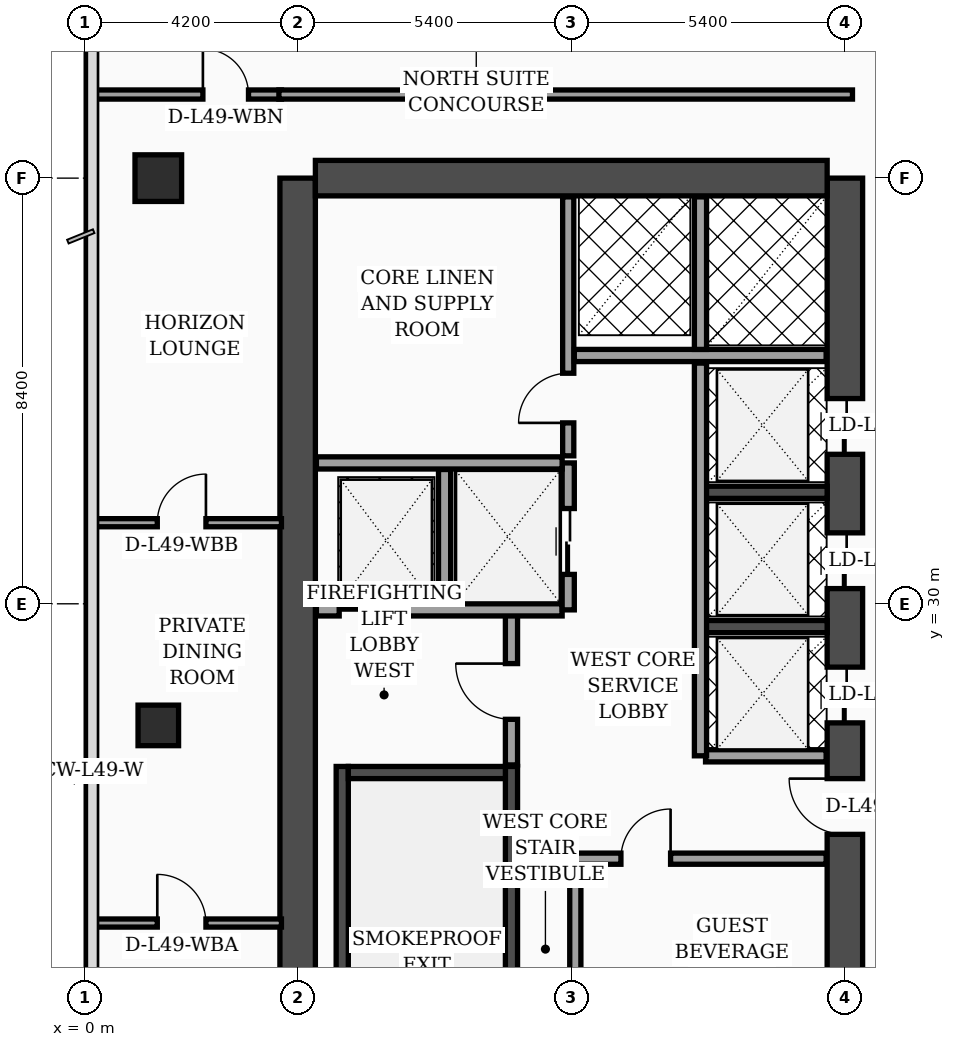
"""IFC4 building model, lengths in metres.
Left out: names, types, materials, properties, quantities, classifications, styles, units other than length and angle.
Written with IfcOpenShell. Run it as: python <this file> out.ifc"""

import sys

from ifc_helpers import new_model, si_unit, direction, frame, frame_2d, origin, origin_2d, place, context, subcontext, project, spatial, rectangle, extrude, element, fill, save


model = new_model("IFC4")
c1 = context("Model", 3, precision=1e-05, world=origin(), true_north=direction((0.0, 1.0)))
c2 = subcontext(c1, "Body", "Model", "MODEL_VIEW")
j1 = project(units=[si_unit("LENGTHUNIT", "METRE"), si_unit("PLANEANGLEUNIT", "RADIAN")], contexts=[c1])
p1 = place(None, origin())
s1 = spatial("IfcSite", under=j1, at=p1, CompositionType="ELEMENT")
p2 = place(p1, origin())
s2 = spatial("IfcBuilding", under=s1, at=p2, CompositionType="ELEMENT")
p3 = place(p2, frame((0.0, 0.0, 199.6)))
s3 = spatial("IfcBuildingStorey", under=s2, at=p3, CompositionType="ELEMENT", Elevation=199.6)
p4 = place(p3, frame((4.2, 16.8, 0.0), z_axis=(0.0, 0.0, 1.0), x_axis=(0.0, 1.0, 0.0)))
e1 = element("IfcWall", 1, at=p4, inside=s3, PredefinedType="SHEAR", context=c2, shape_type="SweptSolid", body=[
    extrude(rectangle(XDim=21.6, YDim=0.7, at=frame_2d((10.8, 0.0))), origin(), (0.0, 0.0, 1.0), 3.56),
])
p5 = place(p3, frame((15.0, 16.8, 0.0), z_axis=(0.0, 0.0, 1.0), x_axis=(0.0, 1.0, 0.0)))
e2 = element("IfcWall", 2, at=p5, inside=s3, PredefinedType="SHEAR", context=c2, shape_type="SweptSolid", body=[
    extrude(rectangle(XDim=21.6, YDim=0.7, at=frame_2d((10.8, 0.0))), origin(), (0.0, 0.0, 1.0), 3.56),
])
p6 = place(p5, frame((8.65, 0.0, 0.0)))
e3 = element("IfcOpeningElement", 3, at=p6, cuts=e2, PredefinedType="OPENING", context=c2, shape_type="SweptSolid", body=[
    extrude(rectangle(XDim=1.1, YDim=2.2, at=frame_2d((0.55, 1.1))), frame((0.0, 0.36, 0.0), z_axis=(0.0, -1.0, 0.0), x_axis=(1.0, 0.0, 0.0)), (0.0, 0.0, 1.0), 0.72),
])
p7 = place(p5, frame((10.85, 0.0, 0.0)))
e4 = element("IfcOpeningElement", 4, at=p7, cuts=e2, PredefinedType="OPENING", context=c2, shape_type="SweptSolid", body=[
    extrude(rectangle(XDim=1.1, YDim=2.2, at=frame_2d((0.55, 1.1))), frame((0.0, 0.36, 0.0), z_axis=(0.0, -1.0, 0.0), x_axis=(1.0, 0.0, 0.0)), (0.0, 0.0, 1.0), 0.72),
])
p8 = place(p5, frame((13.5, 0.0, 0.0)))
e5 = element("IfcOpeningElement", 5, at=p8, cuts=e2, PredefinedType="OPENING", context=c2, shape_type="SweptSolid", body=[
    extrude(rectangle(XDim=1.1, YDim=2.2, at=frame_2d((0.55, 1.1))), frame((0.0, 0.36, 0.0), z_axis=(0.0, -1.0, 0.0), x_axis=(1.0, 0.0, 0.0)), (0.0, 0.0, 1.0), 0.72),
])
p9 = place(p5, frame((16.15, 0.0, 0.0)))
e6 = element("IfcOpeningElement", 6, at=p9, cuts=e2, PredefinedType="OPENING", context=c2, shape_type="SweptSolid", body=[
    extrude(rectangle(XDim=1.1, YDim=2.2, at=frame_2d((0.55, 1.1))), frame((0.0, 0.36, 0.0), z_axis=(0.0, -1.0, 0.0), x_axis=(1.0, 0.0, 0.0)), (0.0, 0.0, 1.0), 0.72),
])
p10 = place(p3, frame((4.55, 38.4, 0.0), z_axis=(0.0, 0.0, 1.0), x_axis=(1.0, 0.0, 0.0)))
e7 = element("IfcWall", 7, at=p10, inside=s3, PredefinedType="SHEAR", context=c2, shape_type="SweptSolid", body=[
    extrude(rectangle(XDim=10.1, YDim=0.7, at=frame_2d((5.05, 0.0))), origin(), (0.0, 0.0, 1.0), 3.56),
])
p11 = place(p3, frame((5.08, 17.15, 0.0), z_axis=(0.0, 0.0, 1.0), x_axis=(0.0, 1.0, 0.0)))
e8 = element("IfcWall", 8, at=p11, inside=s3, PredefinedType="SOLIDWALL", context=c2, shape_type="SweptSolid", body=[
    extrude(rectangle(XDim=9.64, YDim=0.24, at=frame_2d((4.82, 0.0))), origin(), (0.0, 0.0, 1.0), 3.56),
])
p12 = place(p3, frame((8.42, 17.15, 0.0), z_axis=(0.0, 0.0, 1.0), x_axis=(0.0, 1.0, 0.0)))
e9 = element("IfcWall", 9, at=p12, inside=s3, PredefinedType="SOLIDWALL", context=c2, shape_type="SweptSolid", body=[
    extrude(rectangle(XDim=9.64, YDim=0.24, at=frame_2d((4.82, 0.0))), origin(), (0.0, 0.0, 1.0), 3.56),
])
p13 = place(p12, frame((0.35, 0.0, 0.0)))
e10 = element("IfcOpeningElement", 10, at=p13, cuts=e9, PredefinedType="OPENING", context=c2, shape_type="SweptSolid", body=[
    extrude(rectangle(XDim=1.15, YDim=2.2, at=frame_2d((0.575, 1.1))), frame((0.0, 0.13, 0.0), z_axis=(0.0, -1.0, 0.0), x_axis=(1.0, 0.0, 0.0)), (0.0, 0.0, 1.0), 0.26),
])
p14 = place(p3, frame((5.2, 26.67, 0.0), z_axis=(0.0, 0.0, 1.0), x_axis=(1.0, 0.0, 0.0)))
e11 = element("IfcWall", 11, at=p14, inside=s3, PredefinedType="SOLIDWALL", context=c2, shape_type="SweptSolid", body=[
    extrude(rectangle(XDim=3.1, YDim=0.24, at=frame_2d((1.55, 0.0))), origin(), (0.0, 0.0, 1.0), 3.56),
])
for number, where, z_axis, x_axis in (
    (12, (12.18, 29.55, 0.0), (0.0, 0.0, 1.0), (1.0, 0.0, 0.0)),
    (13, (12.18, 32.2, 0.0), (0.0, 0.0, 1.0), (1.0, 0.0, 0.0)),
):
    element("IfcWall", number, at=place(p3, frame(where, z_axis=z_axis, x_axis=x_axis)), inside=s3, PredefinedType="SOLIDWALL", context=c2, shape_type="SweptSolid", body=[
        extrude(rectangle(XDim=2.47, YDim=0.24, at=frame_2d((1.235, 0.0))), origin(), (0.0, 0.0, 1.0), 3.56),
    ])
p15 = place(p3, frame((1.45, 27.6, 0.0), z_axis=(0.0, 0.0, 1.0), x_axis=(1.0, 0.0, 0.0)))
e14 = element("IfcColumn", 14, at=p15, inside=s3, PredefinedType="COLUMN", context=c2, shape_type="SweptSolid", body=[
    extrude(rectangle(XDim=0.8, YDim=0.8, at=origin_2d()), origin(), (0.0, 0.0, 1.0), 3.56),
])
p16 = place(p3, frame((1.45, 38.4, 0.0), z_axis=(0.0, 0.0, 1.0), x_axis=(1.0, 0.0, 0.0)))
e15 = element("IfcColumn", 15, at=p16, inside=s3, PredefinedType="COLUMN", context=c2, shape_type="SweptSolid", body=[
    extrude(rectangle(XDim=0.92, YDim=0.92, at=origin_2d()), origin(), (0.0, 0.0, 1.0), 3.56),
])
p17 = place(p3, frame((8.42, 26.82, 0.0), z_axis=(0.0, 0.0, 1.0), x_axis=(0.0, 1.0, 0.0)))
e16 = element("IfcWall", 16, at=p17, inside=s3, PredefinedType="SOLIDWALL", context=c2, shape_type="SweptSolid", body=[
    extrude(rectangle(XDim=3.0, YDim=0.24, at=frame_2d((1.5, 0.0))), origin(), (0.0, 0.0, 1.0), 3.56),
])
p18 = place(p17, frame((0.9, 0.0, 0.0)))
e17 = element("IfcOpeningElement", 17, at=p18, cuts=e16, PredefinedType="OPENING", context=c2, shape_type="SweptSolid", body=[
    extrude(rectangle(XDim=1.1, YDim=2.2, at=frame_2d((0.55, 1.1))), frame((0.0, 0.13, 0.0), z_axis=(0.0, -1.0, 0.0), x_axis=(1.0, 0.0, 0.0)), (0.0, 0.0, 1.0), 0.26),
])
p19 = place(p3, frame((4.57, 29.88, 0.0), z_axis=(0.0, 0.0, 1.0), x_axis=(1.0, 0.0, 0.0)))
e18 = element("IfcWall", 18, at=p19, inside=s3, PredefinedType="SOLIDWALL", context=c2, shape_type="SweptSolid", body=[
    extrude(rectangle(XDim=4.85, YDim=0.24, at=frame_2d((2.425, 0.0))), origin(), (0.0, 0.0, 1.0), 3.56),
])
p20 = place(p19, frame((0.45, 0.0, 0.0)))
e19 = element("IfcOpeningElement", 19, at=p20, cuts=e18, PredefinedType="OPENING", context=c2, shape_type="SweptSolid", body=[
    extrude(rectangle(XDim=1.3, YDim=2.35, at=frame_2d((0.65, 1.175))), frame((0.0, 0.13, 0.0), z_axis=(0.0, -1.0, 0.0), x_axis=(1.0, 0.0, 0.0)), (0.0, 0.0, 1.0), 0.26),
])
p21 = place(p3, frame((7.1, 30.02, 0.0), z_axis=(0.0, 0.0, 1.0), x_axis=(0.0, 1.0, 0.0)))
e20 = element("IfcWall", 20, at=p21, inside=s3, PredefinedType="SOLIDWALL", context=c2, shape_type="SweptSolid", body=[
    extrude(rectangle(XDim=2.63, YDim=0.24, at=frame_2d((1.315, 0.0))), origin(), (0.0, 0.0, 1.0), 3.56),
])
p22 = place(p3, frame((9.54, 29.88, 0.0), z_axis=(0.0, 0.0, 1.0), x_axis=(0.0, 1.0, 0.0)))
e21 = element("IfcWall", 21, at=p22, inside=s3, PredefinedType="SOLIDWALL", context=c2, shape_type="SweptSolid", body=[
    extrude(rectangle(XDim=2.9, YDim=0.24, at=frame_2d((1.45, 0.0))), origin(), (0.0, 0.0, 1.0), 3.56),
])
p23 = place(p22, frame((0.7, 0.0, 0.0)))
e22 = element("IfcOpeningElement", 22, at=p23, cuts=e21, PredefinedType="OPENING", context=c2, shape_type="SweptSolid", body=[
    extrude(rectangle(XDim=1.3, YDim=2.35, at=frame_2d((0.65, 1.175))), frame((0.0, 0.13, 0.0), z_axis=(0.0, -1.0, 0.0), x_axis=(1.0, 0.0, 0.0)), (0.0, 0.0, 1.0), 0.26),
])
p24 = place(p3, frame((4.57, 32.78, 0.0), z_axis=(0.0, 0.0, 1.0), x_axis=(1.0, 0.0, 0.0)))
e23 = element("IfcWall", 23, at=p24, inside=s3, PredefinedType="SOLIDWALL", context=c2, shape_type="SweptSolid", body=[
    extrude(rectangle(XDim=4.85, YDim=0.24, at=frame_2d((2.425, 0.0))), origin(), (0.0, 0.0, 1.0), 3.19),
])
p25 = place(p3, frame((9.68, 17.17, 0.0), z_axis=(0.0, 0.0, 1.0), x_axis=(0.0, 1.0, 0.0)))
e24 = element("IfcWall", 24, at=p25, inside=s3, PredefinedType="SOLIDWALL", context=c2, shape_type="SweptSolid", body=[
    extrude(rectangle(XDim=7.83, YDim=0.22, at=frame_2d((3.915, 0.0))), origin(), (0.0, 0.0, 1.0), 3.56),
])
p26 = place(p3, frame((9.54, 32.92, 0.0), z_axis=(0.0, 0.0, 1.0), x_axis=(0.0, 1.0, 0.0)))
e25 = element("IfcWall", 25, at=p26, inside=s3, PredefinedType="SOLIDWALL", context=c2, shape_type="SweptSolid", body=[
    extrude(rectangle(XDim=5.11, YDim=0.22, at=frame_2d((2.555, 0.0))), origin(), (0.0, 0.0, 1.0), 3.56),
])
p27 = place(p26, frame((0.65, 0.0, 0.0)))
e26 = element("IfcOpeningElement", 26, at=p27, cuts=e25, PredefinedType="OPENING", context=c2, shape_type="SweptSolid", body=[
    extrude(rectangle(XDim=0.98, YDim=2.15, at=frame_2d((0.49, 1.075))), frame((0.0, 0.12, 0.0), z_axis=(0.0, -1.0, 0.0), x_axis=(1.0, 0.0, 0.0)), (0.0, 0.0, 1.0), 0.24),
])
p28 = place(p3, frame((9.68, 24.97, 0.0), z_axis=(0.0, 0.0, 1.0), x_axis=(1.0, 0.0, 0.0)))
e27 = element("IfcWall", 27, at=p28, inside=s3, PredefinedType="SOLIDWALL", context=c2, shape_type="SweptSolid", body=[
    extrude(rectangle(XDim=4.95, YDim=0.22, at=frame_2d((2.475, 0.0))), origin(), (0.0, 0.0, 1.0), 2.94),
])
p29 = place(p28, frame((0.9, 0.0, 0.0)))
e28 = element("IfcOpeningElement", 28, at=p29, cuts=e27, PredefinedType="OPENING", context=c2, shape_type="SweptSolid", body=[
    extrude(rectangle(XDim=0.98, YDim=2.15, at=frame_2d((0.49, 1.075))), frame((0.0, 0.12, 0.0), z_axis=(0.0, -1.0, 0.0), x_axis=(1.0, 0.0, 0.0)), (0.0, 0.0, 1.0), 0.24),
])
p30 = place(p3, frame((12.25, 27.0, 0.0), z_axis=(0.0, 0.0, 1.0), x_axis=(1.0, 0.0, 0.0)))
e29 = element("IfcWall", 29, at=p30, inside=s3, PredefinedType="SOLIDWALL", context=c2, shape_type="SweptSolid", body=[
    extrude(rectangle(XDim=2.38, YDim=0.24, at=frame_2d((1.19, 0.0))), origin(), (0.0, 0.0, 1.0), 3.56),
])
p31 = place(p3, frame((12.15, 27.0, 0.0), z_axis=(0.0, 0.0, 1.0), x_axis=(0.0, 1.0, 0.0)))
e30 = element("IfcWall", 30, at=p31, inside=s3, PredefinedType="SOLIDWALL", context=c2, shape_type="SweptSolid", body=[
    extrude(rectangle(XDim=7.75, YDim=0.24, at=frame_2d((3.875, 0.0))), origin(), (0.0, 0.0, 1.0), 3.56),
])
p32 = place(p3, frame((9.66, 34.9, 0.0), z_axis=(0.0, 0.0, 1.0), x_axis=(1.0, 0.0, 0.0)))
e31 = element("IfcWall", 31, at=p32, inside=s3, PredefinedType="SOLIDWALL", context=c2, shape_type="SweptSolid", body=[
    extrude(rectangle(XDim=4.97, YDim=0.24, at=frame_2d((2.485, 0.0))), origin(), (0.0, 0.0, 1.0), 3.56),
])
p33 = place(p3, frame((12.15, 35.02, 0.0), z_axis=(0.0, 0.0, 1.0), x_axis=(0.0, 1.0, 0.0)))
e32 = element("IfcWall", 32, at=p33, inside=s3, PredefinedType="SOLIDWALL", context=c2, shape_type="SweptSolid", body=[
    extrude(rectangle(XDim=3.01, YDim=0.24, at=frame_2d((1.505, 0.0))), origin(), (0.0, 0.0, 1.0), 3.56),
])
p34 = place(p3, frame((0.08, 23.7, 0.0), z_axis=(0.0, 0.0, 1.0), x_axis=(1.0, 0.0, 0.0)))
e33 = element("IfcWall", 33, at=p34, inside=s3, PredefinedType="PARTITIONING", context=c2, shape_type="SweptSolid", body=[
    extrude(rectangle(XDim=3.8, YDim=0.16, at=frame_2d((1.9, 0.0))), origin(), (0.0, 0.0, 1.0), 3.09),
])
p35 = place(p34, frame((1.35, 0.0, 0.0)))
e34 = element("IfcOpeningElement", 34, at=p35, cuts=e33, PredefinedType="OPENING", context=c2, shape_type="SweptSolid", body=[
    extrude(rectangle(XDim=0.96, YDim=2.2, at=frame_2d((0.48, 1.1))), frame((0.0, 0.09, 0.0), z_axis=(0.0, -1.0, 0.0), x_axis=(1.0, 0.0, 0.0)), (0.0, 0.0, 1.0), 0.18),
])
p36 = place(p3, frame((0.08, 31.6, 0.0), z_axis=(0.0, 0.0, 1.0), x_axis=(1.0, 0.0, 0.0)))
e35 = element("IfcWall", 35, at=p36, inside=s3, PredefinedType="PARTITIONING", context=c2, shape_type="SweptSolid", body=[
    extrude(rectangle(XDim=3.8, YDim=0.16, at=frame_2d((1.9, 0.0))), origin(), (0.0, 0.0, 1.0), 3.09),
])
p37 = place(p36, frame((1.35, 0.0, 0.0)))
e36 = element("IfcOpeningElement", 36, at=p37, cuts=e35, PredefinedType="OPENING", context=c2, shape_type="SweptSolid", body=[
    extrude(rectangle(XDim=0.96, YDim=2.2, at=frame_2d((0.48, 1.1))), frame((0.0, 0.09, 0.0), z_axis=(0.0, -1.0, 0.0), x_axis=(1.0, 0.0, 0.0)), (0.0, 0.0, 1.0), 0.18),
])
p38 = place(p3, frame((0.08, 40.05, 0.0), z_axis=(0.0, 0.0, 1.0), x_axis=(1.0, 0.0, 0.0)))
e37 = element("IfcWall", 37, at=p38, inside=s3, PredefinedType="PARTITIONING", context=c2, shape_type="SweptSolid", body=[
    extrude(rectangle(XDim=3.8, YDim=0.18, at=frame_2d((1.9, 0.0))), origin(), (0.0, 0.0, 1.0), 2.94),
])
p39 = place(p38, frame((2.25, 0.0, 0.0)))
e38 = element("IfcOpeningElement", 38, at=p39, cuts=e37, PredefinedType="OPENING", context=c2, shape_type="SweptSolid", body=[
    extrude(rectangle(XDim=0.9, YDim=2.15, at=frame_2d((0.45, 1.075))), frame((0.0, 0.1, 0.0), z_axis=(0.0, -1.0, 0.0), x_axis=(1.0, 0.0, 0.0)), (0.0, 0.0, 1.0), 0.2),
])
p40 = place(p3, frame((3.83, 40.05, 0.0), z_axis=(0.0, 0.0, 1.0), x_axis=(1.0, 0.0, 0.0)))
e39 = element("IfcWall", 39, at=p40, inside=s3, PredefinedType="PARTITIONING", context=c2, shape_type="SweptSolid", body=[
    extrude(rectangle(XDim=11.32, YDim=0.18, at=frame_2d((5.66, 0.0))), origin(), (0.0, 0.0, 1.0), 2.94),
])
p41 = place(p18, origin())
e40 = element("IfcDoor", 40, at=p41, inside=s3, OperationType="SINGLE_SWING_RIGHT", PredefinedType="DOOR", context=c2, shape_type="SweptSolid", body=[
    extrude(rectangle(XDim=1.1, YDim=2.2, at=frame_2d((0.55, 1.1))), frame((0.0, 0.025, 0.0), z_axis=(0.0, -1.0, 0.0), x_axis=(1.0, 0.0, 0.0)), (0.0, 0.0, 1.0), 0.05),
])
fill(e17, e40)
p42 = place(p20, origin())
e41 = element("IfcDoor", 41, at=p42, inside=s3, OperationType="DOUBLE_DOOR_SLIDING", PredefinedType="DOOR", context=c2, shape_type="SweptSolid", body=[
    extrude(rectangle(XDim=1.3, YDim=2.35, at=frame_2d((0.65, 1.175))), frame((0.0, 0.025, 0.0), z_axis=(0.0, -1.0, 0.0), x_axis=(1.0, 0.0, 0.0)), (0.0, 0.0, 1.0), 0.05),
])
fill(e19, e41)
p43 = place(p23, origin())
e42 = element("IfcDoor", 42, at=p43, inside=s3, OperationType="DOUBLE_DOOR_SLIDING", PredefinedType="DOOR", context=c2, shape_type="SweptSolid", body=[
    extrude(rectangle(XDim=1.3, YDim=2.35, at=frame_2d((0.65, 1.175))), frame((0.0, 0.025, 0.0), z_axis=(0.0, -1.0, 0.0), x_axis=(1.0, 0.0, 0.0)), (0.0, 0.0, 1.0), 0.05),
])
fill(e22, e42)
p44 = place(p27, origin())
e43 = element("IfcDoor", 43, at=p44, inside=s3, OperationType="SINGLE_SWING_LEFT", PredefinedType="DOOR", context=c2, shape_type="SweptSolid", body=[
    extrude(rectangle(XDim=0.98, YDim=2.15, at=frame_2d((0.49, 1.075))), frame((0.0, 0.025, 0.0), z_axis=(0.0, -1.0, 0.0), x_axis=(1.0, 0.0, 0.0)), (0.0, 0.0, 1.0), 0.05),
])
fill(e26, e43)
p45 = place(p29, origin())
e44 = element("IfcDoor", 44, at=p45, inside=s3, OperationType="SINGLE_SWING_RIGHT", PredefinedType="DOOR", context=c2, shape_type="SweptSolid", body=[
    extrude(rectangle(XDim=0.98, YDim=2.15, at=frame_2d((0.49, 1.075))), frame((0.0, 0.025, 0.0), z_axis=(0.0, -1.0, 0.0), x_axis=(1.0, 0.0, 0.0)), (0.0, 0.0, 1.0), 0.05),
])
fill(e28, e44)
p46 = place(p35, origin())
e45 = element("IfcDoor", 45, at=p46, inside=s3, OperationType="SINGLE_SWING_LEFT", PredefinedType="DOOR", context=c2, shape_type="SweptSolid", body=[
    extrude(rectangle(XDim=0.96, YDim=2.2, at=frame_2d((0.48, 1.1))), frame((0.0, 0.025, 0.0), z_axis=(0.0, -1.0, 0.0), x_axis=(1.0, 0.0, 0.0)), (0.0, 0.0, 1.0), 0.05),
])
fill(e34, e45)
p47 = place(p37, origin())
e46 = element("IfcDoor", 46, at=p47, inside=s3, OperationType="SINGLE_SWING_RIGHT", PredefinedType="DOOR", context=c2, shape_type="SweptSolid", body=[
    extrude(rectangle(XDim=0.96, YDim=2.2, at=frame_2d((0.48, 1.1))), frame((0.0, 0.025, 0.0), z_axis=(0.0, -1.0, 0.0), x_axis=(1.0, 0.0, 0.0)), (0.0, 0.0, 1.0), 0.05),
])
fill(e36, e46)
p48 = place(p39, origin())
e47 = element("IfcDoor", 47, at=p48, inside=s3, OperationType="SINGLE_SWING_LEFT", PredefinedType="DOOR", context=c2, shape_type="SweptSolid", body=[
    extrude(rectangle(XDim=0.9, YDim=2.15, at=frame_2d((0.45, 1.075))), frame((0.0, 0.025, 0.0), z_axis=(0.0, -1.0, 0.0), x_axis=(1.0, 0.0, 0.0)), (0.0, 0.0, 1.0), 0.05),
])
fill(e38, e47)
p49 = place(p6, origin())
e48 = element("IfcDoor", 48, at=p49, inside=s3, OperationType="SINGLE_SWING_RIGHT", PredefinedType="DOOR", context=c2, shape_type="SweptSolid", body=[
    extrude(rectangle(XDim=1.1, YDim=2.2, at=frame_2d((0.55, 1.1))), frame((0.0, 0.025, 0.0), z_axis=(0.0, -1.0, 0.0), x_axis=(1.0, 0.0, 0.0)), (0.0, 0.0, 1.0), 0.05),
])
fill(e3, e48)
p50 = place(p7, origin())
e49 = element("IfcDoor", 49, at=p50, inside=s3, OperationType="DOUBLE_DOOR_SLIDING", PredefinedType="DOOR", context=c2, shape_type="SweptSolid", body=[
    extrude(rectangle(XDim=1.1, YDim=2.2, at=frame_2d((0.55, 1.1))), frame((0.0, 0.025, 0.0), z_axis=(0.0, -1.0, 0.0), x_axis=(1.0, 0.0, 0.0)), (0.0, 0.0, 1.0), 0.05),
])
fill(e4, e49)
p51 = place(p8, origin())
e50 = element("IfcDoor", 50, at=p51, inside=s3, OperationType="DOUBLE_DOOR_SLIDING", PredefinedType="DOOR", context=c2, shape_type="SweptSolid", body=[
    extrude(rectangle(XDim=1.1, YDim=2.2, at=frame_2d((0.55, 1.1))), frame((0.0, 0.025, 0.0), z_axis=(0.0, -1.0, 0.0), x_axis=(1.0, 0.0, 0.0)), (0.0, 0.0, 1.0), 0.05),
])
fill(e5, e50)
p52 = place(p9, origin())
e51 = element("IfcDoor", 51, at=p52, inside=s3, OperationType="DOUBLE_DOOR_SLIDING", PredefinedType="DOOR", context=c2, shape_type="SweptSolid", body=[
    extrude(rectangle(XDim=1.1, YDim=2.2, at=frame_2d((0.55, 1.1))), frame((0.0, 0.025, 0.0), z_axis=(0.0, -1.0, 0.0), x_axis=(1.0, 0.0, 0.0)), (0.0, 0.0, 1.0), 0.05),
])
fill(e6, e51)
save(model, sys.argv[1])
